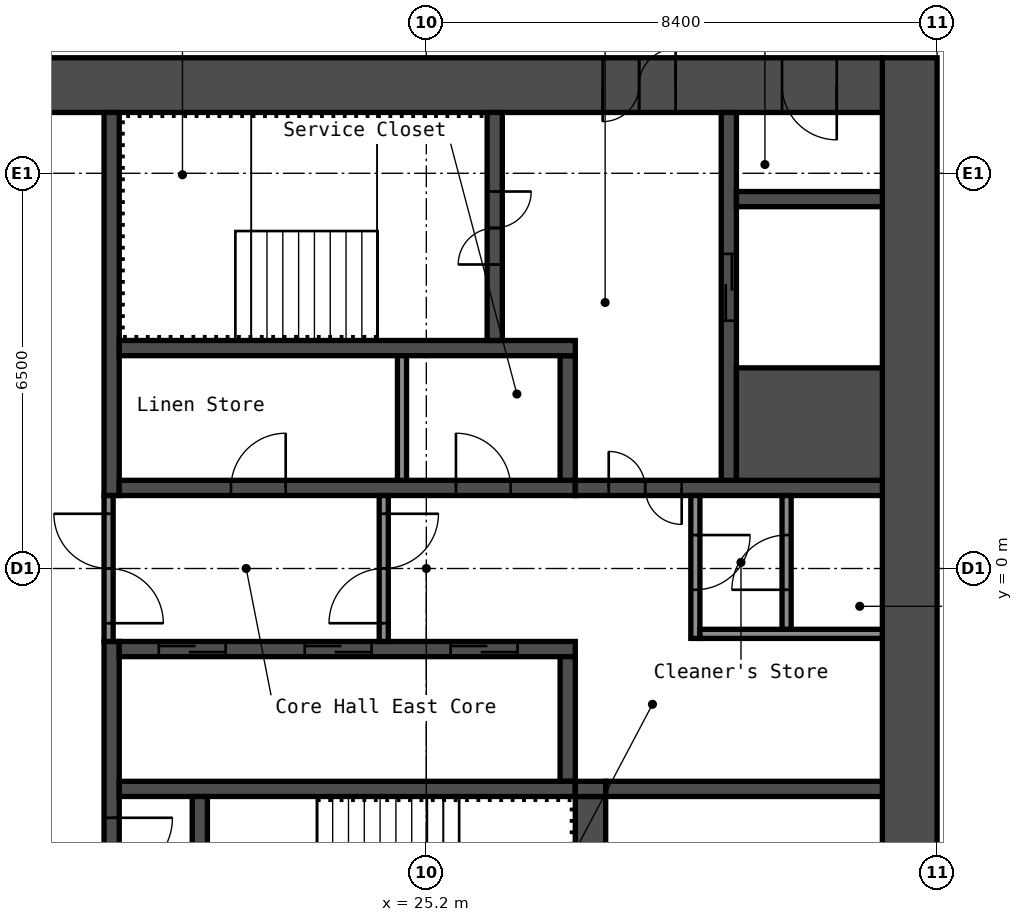
"""IFC4 building model, lengths in metres.
Left out: names, types, materials, properties, quantities, classifications, styles, units other than length and angle.
Written with IfcOpenShell. Run it as: python <this file> out.ifc"""

import sys

from ifc_helpers import new_model, si_unit, direction, frame, frame_2d, origin, place, context, subcontext, project, spatial, rectangle, extrude, element, fill, save


model = new_model("IFC4")
c1 = context("Model", 3, precision=1e-05, world=origin(), true_north=direction((0.0, 1.0)))
c2 = subcontext(c1, "Body", "Model", "MODEL_VIEW")
j1 = project(units=[si_unit("LENGTHUNIT", "METRE"), si_unit("PLANEANGLEUNIT", "RADIAN")], contexts=[c1])
p1 = place(None, origin())
s1 = spatial("IfcSite", under=j1, at=p1, CompositionType="ELEMENT")
p2 = place(p1, origin())
s2 = spatial("IfcBuilding", under=s1, at=p2, CompositionType="ELEMENT")
p3 = place(p2, frame((0.0, 0.0, 218.6)))
s3 = spatial("IfcBuildingStorey", under=s2, at=p3, CompositionType="ELEMENT", Elevation=218.6)
p4 = place(p3, frame((33.15, -8.4, 0.0), z_axis=(0.0, 0.0, 1.0), x_axis=(0.0, 1.0, 0.0)))
e1 = element("IfcWall", 1, at=p4, inside=s3, PredefinedType="SHEAR", context=c2, shape_type="SweptSolid", body=[
    extrude(rectangle(XDim=16.8, YDim=0.9, at=frame_2d((8.4, 0.0))), origin(), (0.0, 0.0, 1.0), 2.75),
])
p5 = place(p3, frame((17.7, 7.95, 0.0), z_axis=(0.0, 0.0, 1.0), x_axis=(1.0, 0.0, 0.0)))
e2 = element("IfcWall", 2, at=p5, inside=s3, PredefinedType="SHEAR", context=c2, shape_type="SweptSolid", body=[
    extrude(rectangle(XDim=15.0, YDim=0.9, at=frame_2d((7.5, 0.0))), origin(), (0.0, 0.0, 1.0), 2.75),
])
p6 = place(p5, frame((10.4, 0.0, 0.0)))
e3 = element("IfcOpeningElement", 3, at=p6, cuts=e2, PredefinedType="OPENING", context=c2, shape_type="SweptSolid", body=[
    extrude(rectangle(XDim=1.2, YDim=2.1, at=frame_2d((0.6, 1.05))), frame((0.0, 0.46, 0.0), z_axis=(0.0, -1.0, 0.0), x_axis=(1.0, 0.0, 0.0)), (0.0, 0.0, 1.0), 0.92),
])
p7 = place(p5, frame((13.35, 0.0, 0.0)))
e4 = element("IfcOpeningElement", 4, at=p7, cuts=e2, PredefinedType="OPENING", context=c2, shape_type="SweptSolid", body=[
    extrude(rectangle(XDim=0.9, YDim=2.1, at=frame_2d((0.45, 1.05))), frame((0.0, 0.46, 0.0), z_axis=(0.0, -1.0, 0.0), x_axis=(1.0, 0.0, 0.0)), (0.0, 0.0, 1.0), 0.92),
])
p8 = place(p3, frame((20.025, 1.2, 0.0), z_axis=(0.0, 0.0, 1.0), x_axis=(0.0, 1.0, 0.0)))
e5 = element("IfcWall", 5, at=p8, inside=s3, PredefinedType="SHEAR", context=c2, shape_type="SweptSolid", body=[
    extrude(rectangle(XDim=6.3, YDim=0.25, at=frame_2d((3.15, 0.0))), origin(), (0.0, 0.0, 1.0), 2.75),
])
p9 = place(p3, frame((20.025, -7.5, 0.0), z_axis=(0.0, 0.0, 1.0), x_axis=(0.0, 1.0, 0.0)))
e6 = element("IfcWall", 6, at=p9, inside=s3, PredefinedType="SHEAR", context=c2, shape_type="SweptSolid", body=[
    extrude(rectangle(XDim=6.3, YDim=0.25, at=frame_2d((3.15, 0.0))), origin(), (0.0, 0.0, 1.0), 2.75),
])
p10 = place(p9, frame((2.4, 0.0, 0.0)))
e7 = element("IfcOpeningElement", 7, at=p10, cuts=e6, PredefinedType="OPENING", context=c2, shape_type="SweptSolid", body=[
    extrude(rectangle(XDim=1.0, YDim=2.1, at=frame_2d((0.5, 1.05))), frame((0.0, 0.135, 0.0), z_axis=(0.0, -1.0, 0.0), x_axis=(1.0, 0.0, 0.0)), (0.0, 0.0, 1.0), 0.27),
])
p11 = place(p3, frame((20.15, 1.325, 0.0), z_axis=(0.0, 0.0, 1.0), x_axis=(1.0, 0.0, 0.0)))
e8 = element("IfcWall", 8, at=p11, inside=s3, PredefinedType="SHEAR", context=c2, shape_type="SweptSolid", body=[
    extrude(rectangle(XDim=7.5, YDim=0.25, at=frame_2d((3.75, 0.0))), origin(), (0.0, 0.0, 1.0), 2.75),
])
p12 = place(p11, frame((1.837, 0.0, 0.0)))
e9 = element("IfcOpeningElement", 9, at=p12, cuts=e8, PredefinedType="OPENING", context=c2, shape_type="SweptSolid", body=[
    extrude(rectangle(XDim=0.9, YDim=2.1, at=frame_2d((0.45, 1.05))), frame((0.0, 0.135, 0.0), z_axis=(0.0, -1.0, 0.0), x_axis=(1.0, 0.0, 0.0)), (0.0, 0.0, 1.0), 0.27),
])
p13 = place(p11, frame((5.538, 0.0, 0.0)))
e10 = element("IfcOpeningElement", 10, at=p13, cuts=e8, PredefinedType="OPENING", context=c2, shape_type="SweptSolid", body=[
    extrude(rectangle(XDim=0.9, YDim=2.1, at=frame_2d((0.45, 1.05))), frame((0.0, 0.135, 0.0), z_axis=(0.0, -1.0, 0.0), x_axis=(1.0, 0.0, 0.0)), (0.0, 0.0, 1.0), 0.27),
])
p14 = place(p3, frame((27.525, 1.45, 0.0), z_axis=(0.0, 0.0, 1.0), x_axis=(0.0, 1.0, 0.0)))
e11 = element("IfcWall", 11, at=p14, inside=s3, PredefinedType="SHEAR", context=c2, shape_type="SweptSolid", body=[
    extrude(rectangle(XDim=2.05, YDim=0.25, at=frame_2d((1.025, 0.0))), origin(), (0.0, 0.0, 1.0), 2.75),
])
p15 = place(p3, frame((20.15, 3.625, 0.0), z_axis=(0.0, 0.0, 1.0), x_axis=(1.0, 0.0, 0.0)))
e12 = element("IfcWall", 12, at=p15, inside=s3, PredefinedType="SHEAR", context=c2, shape_type="SweptSolid", body=[
    extrude(rectangle(XDim=7.5, YDim=0.25, at=frame_2d((3.75, 0.0))), origin(), (0.0, 0.0, 1.0), 2.75),
])
p16 = place(p3, frame((26.325, 3.75, 0.0), z_axis=(0.0, 0.0, 1.0), x_axis=(0.0, 1.0, 0.0)))
e13 = element("IfcWall", 13, at=p16, inside=s3, PredefinedType="SHEAR", context=c2, shape_type="SweptSolid", body=[
    extrude(rectangle(XDim=3.75, YDim=0.25, at=frame_2d((1.875, 0.0))), origin(), (0.0, 0.0, 1.0), 2.75),
])
p17 = place(p16, frame((1.25, 0.0, 0.0)))
e14 = element("IfcOpeningElement", 14, at=p17, cuts=e13, PredefinedType="OPENING", context=c2, shape_type="SweptSolid", body=[
    extrude(rectangle(XDim=1.2, YDim=2.1, at=frame_2d((0.6, 1.05))), frame((0.0, 0.135, 0.0), z_axis=(0.0, -1.0, 0.0), x_axis=(1.0, 0.0, 0.0)), (0.0, 0.0, 1.0), 0.27),
])
p18 = place(p3, frame((27.65, 1.325, 0.0), z_axis=(0.0, 0.0, 1.0), x_axis=(1.0, 0.0, 0.0)))
e15 = element("IfcWall", 15, at=p18, inside=s3, PredefinedType="SHEAR", context=c2, shape_type="SweptSolid", body=[
    extrude(rectangle(XDim=5.05, YDim=0.25, at=frame_2d((2.525, 0.0))), origin(), (0.0, 0.0, 1.0), 2.75),
])
p19 = place(p18, frame((0.55, 0.0, 0.0)))
e16 = element("IfcOpeningElement", 16, at=p19, cuts=e15, PredefinedType="OPENING", context=c2, shape_type="SweptSolid", body=[
    extrude(rectangle(XDim=1.2, YDim=2.1, at=frame_2d((0.6, 1.05))), frame((0.0, 0.135, 0.0), z_axis=(0.0, -1.0, 0.0), x_axis=(1.0, 0.0, 0.0)), (0.0, 0.0, 1.0), 0.27),
])
p20 = place(p3, frame((30.175, 1.45, 0.0), z_axis=(0.0, 0.0, 1.0), x_axis=(0.0, 1.0, 0.0)))
e17 = element("IfcWall", 17, at=p20, inside=s3, PredefinedType="SHEAR", context=c2, shape_type="SweptSolid", body=[
    extrude(rectangle(XDim=6.05, YDim=0.25, at=frame_2d((3.025, 0.0))), origin(), (0.0, 0.0, 1.0), 2.75),
])
p21 = place(p20, frame((2.625, 0.0, 0.0)))
e18 = element("IfcOpeningElement", 18, at=p21, cuts=e17, PredefinedType="OPENING", context=c2, shape_type="SweptSolid", body=[
    extrude(rectangle(XDim=1.1, YDim=2.1, at=frame_2d((0.55, 1.05))), frame((0.0, 0.135, 0.0), z_axis=(0.0, -1.0, 0.0), x_axis=(1.0, 0.0, 0.0)), (0.0, 0.0, 1.0), 0.27),
])
p22 = place(p3, frame((30.3, 2.375, 0.0), z_axis=(0.0, 0.0, 1.0), x_axis=(1.0, 0.0, 0.0)))
e19 = element("IfcWall", 19, at=p22, inside=s3, PredefinedType="SHEAR", context=c2, shape_type="SweptSolid", body=[
    extrude(rectangle(XDim=2.4, YDim=1.85, at=frame_2d((1.2, 0.0))), origin(), (0.0, 0.0, 1.0), 2.75),
])
p23 = place(p3, frame((30.3, 6.075, 0.0), z_axis=(0.0, 0.0, 1.0), x_axis=(1.0, 0.0, 0.0)))
e20 = element("IfcWall", 20, at=p23, inside=s3, PredefinedType="SHEAR", context=c2, shape_type="SweptSolid", body=[
    extrude(rectangle(XDim=2.4, YDim=0.25, at=frame_2d((1.2, 0.0))), origin(), (0.0, 0.0, 1.0), 2.75),
])
p24 = place(p3, frame((20.15, -1.325, 0.0), z_axis=(0.0, 0.0, 1.0), x_axis=(1.0, 0.0, 0.0)))
e21 = element("IfcWall", 21, at=p24, inside=s3, PredefinedType="SHEAR", context=c2, shape_type="SweptSolid", body=[
    extrude(rectangle(XDim=7.5, YDim=0.25, at=frame_2d((3.75, 0.0))), origin(), (0.0, 0.0, 1.0), 2.75),
])
p25 = place(p24, frame((0.65, 0.0, 0.0)))
e22 = element("IfcOpeningElement", 22, at=p25, cuts=e21, PredefinedType="OPENING", context=c2, shape_type="SweptSolid", body=[
    extrude(rectangle(XDim=1.1, YDim=2.1, at=frame_2d((0.55, 1.05))), frame((0.0, 0.135, 0.0), z_axis=(0.0, -1.0, 0.0), x_axis=(1.0, 0.0, 0.0)), (0.0, 0.0, 1.0), 0.27),
])
p26 = place(p24, frame((3.05, 0.0, 0.0)))
e23 = element("IfcOpeningElement", 23, at=p26, cuts=e21, PredefinedType="OPENING", context=c2, shape_type="SweptSolid", body=[
    extrude(rectangle(XDim=1.1, YDim=2.1, at=frame_2d((0.55, 1.05))), frame((0.0, 0.135, 0.0), z_axis=(0.0, -1.0, 0.0), x_axis=(1.0, 0.0, 0.0)), (0.0, 0.0, 1.0), 0.27),
])
p27 = place(p24, frame((5.45, 0.0, 0.0)))
e24 = element("IfcOpeningElement", 24, at=p27, cuts=e21, PredefinedType="OPENING", context=c2, shape_type="SweptSolid", body=[
    extrude(rectangle(XDim=1.1, YDim=2.1, at=frame_2d((0.55, 1.05))), frame((0.0, 0.135, 0.0), z_axis=(0.0, -1.0, 0.0), x_axis=(1.0, 0.0, 0.0)), (0.0, 0.0, 1.0), 0.27),
])
p28 = place(p3, frame((27.525, -3.5, 0.0), z_axis=(0.0, 0.0, 1.0), x_axis=(0.0, 1.0, 0.0)))
e25 = element("IfcWall", 25, at=p28, inside=s3, PredefinedType="SHEAR", context=c2, shape_type="SweptSolid", body=[
    extrude(rectangle(XDim=2.05, YDim=0.25, at=frame_2d((1.025, 0.0))), origin(), (0.0, 0.0, 1.0), 2.75),
])
p29 = place(p3, frame((20.15, -3.625, 0.0), z_axis=(0.0, 0.0, 1.0), x_axis=(1.0, 0.0, 0.0)))
e26 = element("IfcWall", 26, at=p29, inside=s3, PredefinedType="SHEAR", context=c2, shape_type="SweptSolid", body=[
    extrude(rectangle(XDim=7.5, YDim=0.25, at=frame_2d((3.75, 0.0))), origin(), (0.0, 0.0, 1.0), 2.75),
])
p30 = place(p3, frame((21.475, -7.5, 0.0), z_axis=(0.0, 0.0, 1.0), x_axis=(0.0, 1.0, 0.0)))
e27 = element("IfcWall", 27, at=p30, inside=s3, PredefinedType="SHEAR", context=c2, shape_type="SweptSolid", body=[
    extrude(rectangle(XDim=3.75, YDim=0.25, at=frame_2d((1.875, 0.0))), origin(), (0.0, 0.0, 1.0), 2.75),
])
p31 = place(p30, frame((1.3, 0.0, 0.0)))
e28 = element("IfcOpeningElement", 28, at=p31, cuts=e27, PredefinedType="OPENING", context=c2, shape_type="SweptSolid", body=[
    extrude(rectangle(XDim=1.2, YDim=2.1, at=frame_2d((0.6, 1.05))), frame((0.0, 0.135, 0.0), z_axis=(0.0, -1.0, 0.0), x_axis=(1.0, 0.0, 0.0)), (0.0, 0.0, 1.0), 0.27),
])
p32 = place(p3, frame((27.9, -7.5, 0.0), z_axis=(0.0, 0.0, 1.0), x_axis=(0.0, 1.0, 0.0)))
e29 = element("IfcWall", 29, at=p32, inside=s3, PredefinedType="SHEAR", context=c2, shape_type="SweptSolid", body=[
    extrude(rectangle(XDim=3.75, YDim=0.5, at=frame_2d((1.875, 0.0))), origin(), (0.0, 0.0, 1.0), 2.75),
])
p33 = place(p3, frame((28.15, -3.625, 0.0), z_axis=(0.0, 0.0, 1.0), x_axis=(1.0, 0.0, 0.0)))
e30 = element("IfcWall", 30, at=p33, inside=s3, PredefinedType="SHEAR", context=c2, shape_type="SweptSolid", body=[
    extrude(rectangle(XDim=4.55, YDim=0.25, at=frame_2d((2.275, 0.0))), origin(), (0.0, 0.0, 1.0), 2.75),
])
p34 = place(p3, frame((27.65, -3.625, 0.0), z_axis=(0.0, 0.0, 1.0), x_axis=(1.0, 0.0, 0.0)))
e31 = element("IfcWall", 31, at=p34, inside=s3, PredefinedType="SHEAR", context=c2, shape_type="SweptSolid", body=[
    extrude(rectangle(XDim=0.5, YDim=0.25, at=frame_2d((0.25, 0.0))), origin(), (0.0, 0.0, 1.0), 2.75),
])
p35 = place(p3, frame((19.975, -1.2, 0.0), z_axis=(0.0, 0.0, 1.0), x_axis=(0.0, 1.0, 0.0)))
e32 = element("IfcWall", 32, at=p35, inside=s3, PredefinedType="PARTITIONING", context=c2, shape_type="SweptSolid", body=[
    extrude(rectangle(XDim=2.4, YDim=0.15, at=frame_2d((1.2, 0.0))), origin(), (0.0, 0.0, 1.0), 2.75),
])
p36 = place(p35, frame((0.3, 0.0, 0.0)))
e33 = element("IfcOpeningElement", 33, at=p36, cuts=e32, PredefinedType="OPENING", context=c2, shape_type="SweptSolid", body=[
    extrude(rectangle(XDim=1.8, YDim=2.1, at=frame_2d((0.9, 1.05))), frame((0.0, 0.085, 0.0), z_axis=(0.0, -1.0, 0.0), x_axis=(1.0, 0.0, 0.0)), (0.0, 0.0, 1.0), 0.17),
])
p37 = place(p3, frame((24.5, -1.2, 0.0), z_axis=(0.0, 0.0, 1.0), x_axis=(0.0, 1.0, 0.0)))
e34 = element("IfcWall", 34, at=p37, inside=s3, PredefinedType="PARTITIONING", context=c2, shape_type="SweptSolid", body=[
    extrude(rectangle(XDim=2.4, YDim=0.15, at=frame_2d((1.2, 0.0))), origin(), (0.0, 0.0, 1.0), 2.75),
])
p38 = place(p37, frame((0.3, 0.0, 0.0)))
e35 = element("IfcOpeningElement", 35, at=p38, cuts=e34, PredefinedType="OPENING", context=c2, shape_type="SweptSolid", body=[
    extrude(rectangle(XDim=1.8, YDim=2.1, at=frame_2d((0.9, 1.05))), frame((0.0, 0.085, 0.0), z_axis=(0.0, -1.0, 0.0), x_axis=(1.0, 0.0, 0.0)), (0.0, 0.0, 1.0), 0.17),
])
p39 = place(p3, frame((29.625, -1.15, 0.0), z_axis=(0.0, 0.0, 1.0), x_axis=(0.0, 1.0, 0.0)))
e36 = element("IfcWall", 36, at=p39, inside=s3, PredefinedType="PARTITIONING", context=c2, shape_type="SweptSolid", body=[
    extrude(rectangle(XDim=2.35, YDim=0.15, at=frame_2d((1.175, 0.0))), origin(), (0.0, 0.0, 1.0), 2.75),
])
p40 = place(p39, frame((0.8, 0.0, 0.0)))
e37 = element("IfcOpeningElement", 37, at=p40, cuts=e36, PredefinedType="OPENING", context=c2, shape_type="SweptSolid", body=[
    extrude(rectangle(XDim=0.9, YDim=2.1, at=frame_2d((0.45, 1.05))), frame((0.0, 0.085, 0.0), z_axis=(0.0, -1.0, 0.0), x_axis=(1.0, 0.0, 0.0)), (0.0, 0.0, 1.0), 0.17),
])
p41 = place(p3, frame((29.7, -1.075, 0.0), z_axis=(0.0, 0.0, 1.0), x_axis=(1.0, 0.0, 0.0)))
e38 = element("IfcWall", 38, at=p41, inside=s3, PredefinedType="PARTITIONING", context=c2, shape_type="SweptSolid", body=[
    extrude(rectangle(XDim=3.0, YDim=0.15, at=frame_2d((1.5, 0.0))), origin(), (0.0, 0.0, 1.0), 2.75),
])
p42 = place(p3, frame((31.125, -1.0, 0.0), z_axis=(0.0, 0.0, 1.0), x_axis=(0.0, 1.0, 0.0)))
e39 = element("IfcWall", 39, at=p42, inside=s3, PredefinedType="PARTITIONING", context=c2, shape_type="SweptSolid", body=[
    extrude(rectangle(XDim=2.2, YDim=0.15, at=frame_2d((1.1, 0.0))), origin(), (0.0, 0.0, 1.0), 2.75),
])
p43 = place(p42, frame((0.65, 0.0, 0.0)))
e40 = element("IfcOpeningElement", 40, at=p43, cuts=e39, PredefinedType="OPENING", context=c2, shape_type="SweptSolid", body=[
    extrude(rectangle(XDim=0.9, YDim=2.1, at=frame_2d((0.45, 1.05))), frame((0.0, 0.085, 0.0), z_axis=(0.0, -1.0, 0.0), x_axis=(1.0, 0.0, 0.0)), (0.0, 0.0, 1.0), 0.17),
])
p44 = place(p3, frame((24.8, 1.45, 0.0), z_axis=(0.0, 0.0, 1.0), x_axis=(0.0, 1.0, 0.0)))
e41 = element("IfcWall", 41, at=p44, inside=s3, PredefinedType="PARTITIONING", context=c2, shape_type="SweptSolid", body=[
    extrude(rectangle(XDim=2.05, YDim=0.15, at=frame_2d((1.025, 0.0))), origin(), (0.0, 0.0, 1.0), 2.75),
])
p45 = place(p6, origin())
e42 = element("IfcDoor", 42, at=p45, inside=s3, OperationType="DOUBLE_DOOR_SINGLE_SWING", PredefinedType="DOOR", context=c2, shape_type="SweptSolid", body=[
    extrude(rectangle(XDim=1.2, YDim=2.1, at=frame_2d((0.6, 1.05))), frame((0.0, 0.025, 0.0), z_axis=(0.0, -1.0, 0.0), x_axis=(1.0, 0.0, 0.0)), (0.0, 0.0, 1.0), 0.05),
])
fill(e3, e42)
p46 = place(p7, origin())
e43 = element("IfcDoor", 43, at=p46, inside=s3, OperationType="SINGLE_SWING_RIGHT", PredefinedType="DOOR", context=c2, shape_type="SweptSolid", body=[
    extrude(rectangle(XDim=0.9, YDim=2.1, at=frame_2d((0.45, 1.05))), frame((0.0, 0.025, 0.0), z_axis=(0.0, -1.0, 0.0), x_axis=(1.0, 0.0, 0.0)), (0.0, 0.0, 1.0), 0.05),
])
fill(e4, e43)
p47 = place(p17, origin())
e44 = element("IfcDoor", 44, at=p47, inside=s3, OperationType="DOUBLE_DOOR_SINGLE_SWING", PredefinedType="DOOR", context=c2, shape_type="SweptSolid", body=[
    extrude(rectangle(XDim=1.2, YDim=2.1, at=frame_2d((0.6, 1.05))), frame((0.0, 0.025, 0.0), z_axis=(0.0, -1.0, 0.0), x_axis=(1.0, 0.0, 0.0)), (0.0, 0.0, 1.0), 0.05),
])
fill(e14, e44)
p48 = place(p10, origin())
e45 = element("IfcDoor", 45, at=p48, inside=s3, OperationType="SINGLE_SWING_RIGHT", PredefinedType="DOOR", context=c2, shape_type="SweptSolid", body=[
    extrude(rectangle(XDim=1.0, YDim=2.1, at=frame_2d((0.5, 1.05))), frame((0.0, 0.025, 0.0), z_axis=(0.0, -1.0, 0.0), x_axis=(1.0, 0.0, 0.0)), (0.0, 0.0, 1.0), 0.05),
])
fill(e7, e45)
p49 = place(p19, origin())
e46 = element("IfcDoor", 46, at=p49, inside=s3, OperationType="DOUBLE_DOOR_SINGLE_SWING", PredefinedType="DOOR", context=c2, shape_type="SweptSolid", body=[
    extrude(rectangle(XDim=1.2, YDim=2.1, at=frame_2d((0.6, 1.05))), frame((0.0, 0.025, 0.0), z_axis=(0.0, -1.0, 0.0), x_axis=(1.0, 0.0, 0.0)), (0.0, 0.0, 1.0), 0.05),
])
fill(e16, e46)
p50 = place(p36, origin())
e47 = element("IfcDoor", 47, at=p50, inside=s3, OperationType="DOUBLE_DOOR_SINGLE_SWING", PredefinedType="DOOR", context=c2, shape_type="SweptSolid", body=[
    extrude(rectangle(XDim=1.8, YDim=2.1, at=frame_2d((0.9, 1.05))), frame((0.0, 0.025, 0.0), z_axis=(0.0, -1.0, 0.0), x_axis=(1.0, 0.0, 0.0)), (0.0, 0.0, 1.0), 0.05),
])
fill(e33, e47)
p51 = place(p38, origin())
e48 = element("IfcDoor", 48, at=p51, inside=s3, OperationType="DOUBLE_DOOR_SINGLE_SWING", PredefinedType="DOOR", context=c2, shape_type="SweptSolid", body=[
    extrude(rectangle(XDim=1.8, YDim=2.1, at=frame_2d((0.9, 1.05))), frame((0.0, 0.025, 0.0), z_axis=(0.0, -1.0, 0.0), x_axis=(1.0, 0.0, 0.0)), (0.0, 0.0, 1.0), 0.05),
])
fill(e35, e48)
p52 = place(p40, origin())
e49 = element("IfcDoor", 49, at=p52, inside=s3, OperationType="SINGLE_SWING_RIGHT", PredefinedType="DOOR", context=c2, shape_type="SweptSolid", body=[
    extrude(rectangle(XDim=0.9, YDim=2.1, at=frame_2d((0.45, 1.05))), frame((0.0, 0.025, 0.0), z_axis=(0.0, -1.0, 0.0), x_axis=(1.0, 0.0, 0.0)), (0.0, 0.0, 1.0), 0.05),
])
fill(e37, e49)
p53 = place(p43, origin())
e50 = element("IfcDoor", 50, at=p53, inside=s3, OperationType="SINGLE_SWING_RIGHT", PredefinedType="DOOR", context=c2, shape_type="SweptSolid", body=[
    extrude(rectangle(XDim=0.9, YDim=2.1, at=frame_2d((0.45, 1.05))), frame((0.0, 0.025, 0.0), z_axis=(0.0, -1.0, 0.0), x_axis=(1.0, 0.0, 0.0)), (0.0, 0.0, 1.0), 0.05),
])
fill(e40, e50)
p54 = place(p12, origin())
e51 = element("IfcDoor", 51, at=p54, inside=s3, OperationType="SINGLE_SWING_LEFT", PredefinedType="DOOR", context=c2, shape_type="SweptSolid", body=[
    extrude(rectangle(XDim=0.9, YDim=2.1, at=frame_2d((0.45, 1.05))), frame((0.0, 0.025, 0.0), z_axis=(0.0, -1.0, 0.0), x_axis=(1.0, 0.0, 0.0)), (0.0, 0.0, 1.0), 0.05),
])
fill(e9, e51)
p55 = place(p13, origin())
e52 = element("IfcDoor", 52, at=p55, inside=s3, OperationType="SINGLE_SWING_RIGHT", PredefinedType="DOOR", context=c2, shape_type="SweptSolid", body=[
    extrude(rectangle(XDim=0.9, YDim=2.1, at=frame_2d((0.45, 1.05))), frame((0.0, 0.025, 0.0), z_axis=(0.0, -1.0, 0.0), x_axis=(1.0, 0.0, 0.0)), (0.0, 0.0, 1.0), 0.05),
])
fill(e10, e52)
p56 = place(p25, origin())
e53 = element("IfcDoor", 53, at=p56, inside=s3, OperationType="DOUBLE_DOOR_SLIDING", PredefinedType="DOOR", context=c2, shape_type="SweptSolid", body=[
    extrude(rectangle(XDim=1.1, YDim=2.1, at=frame_2d((0.55, 1.05))), frame((0.0, 0.025, 0.0), z_axis=(0.0, -1.0, 0.0), x_axis=(1.0, 0.0, 0.0)), (0.0, 0.0, 1.0), 0.05),
])
fill(e22, e53)
p57 = place(p26, origin())
e54 = element("IfcDoor", 54, at=p57, inside=s3, OperationType="DOUBLE_DOOR_SLIDING", PredefinedType="DOOR", context=c2, shape_type="SweptSolid", body=[
    extrude(rectangle(XDim=1.1, YDim=2.1, at=frame_2d((0.55, 1.05))), frame((0.0, 0.025, 0.0), z_axis=(0.0, -1.0, 0.0), x_axis=(1.0, 0.0, 0.0)), (0.0, 0.0, 1.0), 0.05),
])
fill(e23, e54)
p58 = place(p27, origin())
e55 = element("IfcDoor", 55, at=p58, inside=s3, OperationType="DOUBLE_DOOR_SLIDING", PredefinedType="DOOR", context=c2, shape_type="SweptSolid", body=[
    extrude(rectangle(XDim=1.1, YDim=2.1, at=frame_2d((0.55, 1.05))), frame((0.0, 0.025, 0.0), z_axis=(0.0, -1.0, 0.0), x_axis=(1.0, 0.0, 0.0)), (0.0, 0.0, 1.0), 0.05),
])
fill(e24, e55)
p59 = place(p21, origin())
e56 = element("IfcDoor", 56, at=p59, inside=s3, OperationType="DOUBLE_DOOR_SLIDING", PredefinedType="DOOR", context=c2, shape_type="SweptSolid", body=[
    extrude(rectangle(XDim=1.1, YDim=2.1, at=frame_2d((0.55, 1.05))), frame((0.0, 0.025, 0.0), z_axis=(0.0, -1.0, 0.0), x_axis=(1.0, 0.0, 0.0)), (0.0, 0.0, 1.0), 0.05),
])
fill(e18, e56)
save(model, sys.argv[1])
